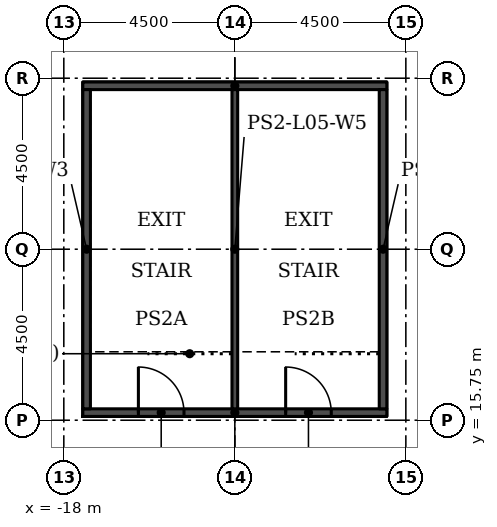
"""IFC4 building model, lengths in metres.
Left out: names, types, materials, properties, quantities, classifications, styles, units other than length and angle.
Written with IfcOpenShell. Run it as: python <this file> out.ifc"""

import sys

from ifc_helpers import new_model, si_unit, direction, frame, frame_2d, origin, place, context, subcontext, project, spatial, rectangle, extrude, element, fill, save


model = new_model("IFC4")
c1 = context("Model", 3, precision=1e-05, world=origin(), true_north=direction((0.0, 1.0)))
c2 = subcontext(c1, "Body", "Model", "MODEL_VIEW")
j1 = project(units=[si_unit("LENGTHUNIT", "METRE"), si_unit("PLANEANGLEUNIT", "RADIAN")], contexts=[c1])
p1 = place(None, origin())
s1 = spatial("IfcSite", under=j1, at=p1, CompositionType="ELEMENT")
p2 = place(p1, origin())
s2 = spatial("IfcBuilding", under=s1, at=p2, CompositionType="ELEMENT")
p3 = place(p2, frame((0.0, 0.0, 28.5)))
s3 = spatial("IfcBuildingStorey", under=s2, at=p3, CompositionType="ELEMENT", Elevation=28.5)
p4 = place(p3, frame((-17.5, 15.95, 0.0)))
e1 = element("IfcWall", 1, at=p4, inside=s3, PredefinedType="SHEAR", context=c2, shape_type="SweptSolid", body=[
    extrude(rectangle(XDim=8.0, YDim=0.2, at=frame_2d((4.0, 0.0))), origin(), (0.0, 0.0, 1.0), 2.8),
])
p5 = place(p4, frame((1.462, 0.0, 0.0)))
e2 = element("IfcOpeningElement", 2, at=p5, cuts=e1, PredefinedType="OPENING", context=c2, shape_type="SweptSolid", body=[
    extrude(rectangle(XDim=1.2, YDim=2.4, at=frame_2d((0.6, 1.2))), frame((0.0, 0.11, 0.0), z_axis=(0.0, -1.0, 0.0), x_axis=(1.0, 0.0, 0.0)), (0.0, 0.0, 1.0), 0.22),
])
p6 = place(p4, frame((5.337, 0.0, 0.0)))
e3 = element("IfcOpeningElement", 3, at=p6, cuts=e1, PredefinedType="OPENING", context=c2, shape_type="SweptSolid", body=[
    extrude(rectangle(XDim=1.2, YDim=2.4, at=frame_2d((0.6, 1.2))), frame((0.0, 0.11, 0.0), z_axis=(0.0, -1.0, 0.0), x_axis=(1.0, 0.0, 0.0)), (0.0, 0.0, 1.0), 0.22),
])
p7 = place(p3, frame((-17.5, 24.55, 0.0)))
e4 = element("IfcWall", 4, at=p7, inside=s3, PredefinedType="SHEAR", context=c2, shape_type="SweptSolid", body=[
    extrude(rectangle(XDim=8.0, YDim=0.2, at=frame_2d((4.0, 0.0))), origin(), (0.0, 0.0, 1.0), 2.8),
])
for number, where, z_axis, x_axis in (
    (5, (-17.4, 16.05, 0.0), (0.0, 0.0, 1.0), (0.0, 1.0, 0.0)),
    (6, (-9.6, 16.05, 0.0), (0.0, 0.0, 1.0), (0.0, 1.0, 0.0)),
):
    element("IfcWall", number, at=place(p3, frame(where, z_axis=z_axis, x_axis=x_axis)), inside=s3, PredefinedType="SHEAR", context=c2, shape_type="SweptSolid", body=[
        extrude(rectangle(XDim=8.4, YDim=0.2, at=frame_2d((4.2, 0.0))), origin(), (0.0, 0.0, 1.0), 2.8),
    ])
p8 = place(p3, frame((-13.5, 16.05, 0.0), z_axis=(0.0, 0.0, 1.0), x_axis=(0.0, 1.0, 0.0)))
e7 = element("IfcWall", 7, at=p8, inside=s3, PredefinedType="SHEAR", context=c2, shape_type="SweptSolid", body=[
    extrude(rectangle(XDim=8.4, YDim=0.15, at=frame_2d((4.2, 0.0))), origin(), (0.0, 0.0, 1.0), 2.8),
])
p9 = place(p5, origin())
e8 = element("IfcDoor", 8, at=p9, inside=s3, OperationType="SINGLE_SWING_LEFT", PredefinedType="DOOR", context=c2, shape_type="SweptSolid", body=[
    extrude(rectangle(XDim=1.2, YDim=2.4, at=frame_2d((0.6, 1.2))), frame((0.0, 0.025, 0.0), z_axis=(0.0, -1.0, 0.0), x_axis=(1.0, 0.0, 0.0)), (0.0, 0.0, 1.0), 0.05),
])
fill(e2, e8)
p10 = place(p6, origin())
e9 = element("IfcDoor", 9, at=p10, inside=s3, OperationType="SINGLE_SWING_RIGHT", PredefinedType="DOOR", context=c2, shape_type="SweptSolid", body=[
    extrude(rectangle(XDim=1.2, YDim=2.4, at=frame_2d((0.6, 1.2))), frame((0.0, 0.025, 0.0), z_axis=(0.0, -1.0, 0.0), x_axis=(1.0, 0.0, 0.0)), (0.0, 0.0, 1.0), 0.05),
])
fill(e3, e9)
save(model, sys.argv[1])
